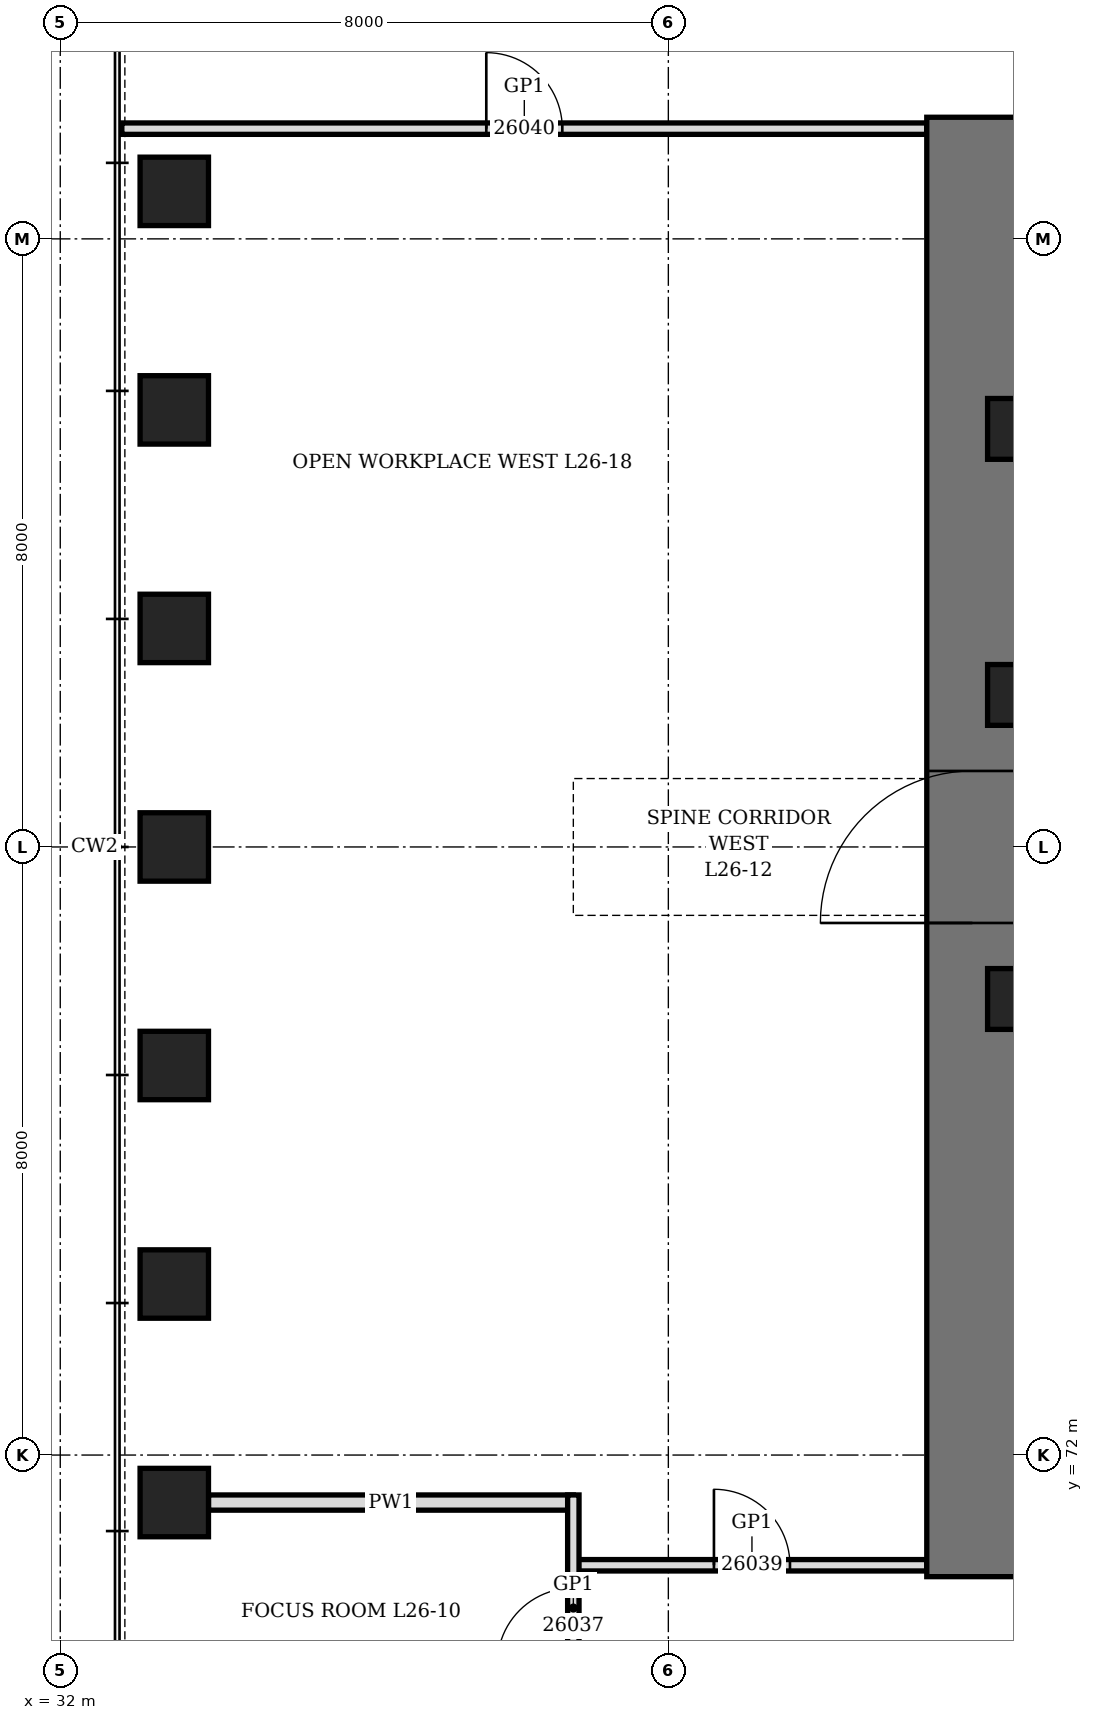
"""IFC4 building model, lengths in metres.
Left out: names, types, materials, properties, quantities, classifications, styles, units other than length and angle.
Written with IfcOpenShell. Run it as: python <this file> out.ifc"""

import sys

from ifc_helpers import new_model, si_unit, direction, frame, frame_2d, origin, origin_2d, place, context, subcontext, project, spatial, rectangle, hollow_rectangle, extrude, element, fill, save


model = new_model("IFC4")
c1 = context("Model", 3, precision=1e-05, world=origin(), true_north=direction((0.0, 1.0)))
c2 = subcontext(c1, "Body", "Model", "MODEL_VIEW")
j1 = project(units=[si_unit("LENGTHUNIT", "METRE"), si_unit("PLANEANGLEUNIT", "RADIAN")], contexts=[c1])
p1 = place(None, origin())
s1 = spatial("IfcSite", under=j1, at=p1, CompositionType="ELEMENT")
p2 = place(p1, origin())
s2 = spatial("IfcBuilding", under=s1, at=p2, CompositionType="ELEMENT")
p3 = place(p2, frame((0.0, 0.0, 120.7)))
s3 = spatial("IfcBuildingStorey", under=s2, at=p3, CompositionType="ELEMENT", Elevation=120.7)
for number, where, z_axis, x_axis in (
    (1, (33.5, 88.625, 0.0), (0.0, 0.0, 1.0), (0.0, 1.0, 0.0)),
    (2, (33.5, 85.75, 0.0), (0.0, 0.0, 1.0), (0.0, 1.0, 0.0)),
    (3, (33.5, 82.875, 0.0), (0.0, 0.0, 1.0), (0.0, 1.0, 0.0)),
    (4, (33.5, 80.0, 0.0), (0.0, 0.0, 1.0), (0.0, 1.0, 0.0)),
    (5, (33.5, 77.125, 0.0), (0.0, 0.0, 1.0), (0.0, 1.0, 0.0)),
    (6, (33.5, 74.25, 0.0), (0.0, 0.0, 1.0), (0.0, 1.0, 0.0)),
    (7, (33.5, 71.375, 0.0), (0.0, 0.0, 1.0), (0.0, 1.0, 0.0)),
):
    element("IfcColumn", number, at=place(p3, frame(where, z_axis=z_axis, x_axis=x_axis)), inside=s3, PredefinedType="COLUMN", context=c2, shape_type="SweptSolid", body=[
        extrude(hollow_rectangle(XDim=0.9, YDim=0.9, WallThickness=0.15, at=origin_2d()), origin(), (0.0, 0.0, 1.0), 4.2),
    ])
p4 = place(p3, frame((44.0, 70.4, 0.0), z_axis=(0.0, 0.0, 1.0), x_axis=(0.0, 1.0, 0.0)))
e8 = element("IfcWall", 8, at=p4, inside=s3, PredefinedType="SHEAR", context=c2, shape_type="SweptSolid", body=[
    extrude(rectangle(XDim=19.2, YDim=1.2, at=frame_2d((9.6, 0.0))), origin(), (0.0, 0.0, 1.0), 4.2),
])
p5 = place(p4, frame((8.6, 0.0, 0.0)))
e9 = element("IfcOpeningElement", 9, at=p5, cuts=e8, PredefinedType="OPENING", context=c2, shape_type="SweptSolid", body=[
    extrude(rectangle(XDim=2.0, YDim=2.4, at=frame_2d((1.0, 1.2))), frame((0.0, 0.61, 0.0), z_axis=(0.0, -1.0, 0.0), x_axis=(1.0, 0.0, 0.0)), (0.0, 0.0, 1.0), 1.22),
])
for number, where, z_axis, x_axis in (
    (10, (44.6, 78.0, 0.0), (0.0, 0.0, 1.0), (1.0, 0.0, 0.0)),
    (11, (44.6, 82.0, 0.0), (0.0, 0.0, 1.0), (1.0, 0.0, 0.0)),
    (12, (44.6, 85.5, 0.0), (0.0, 0.0, 1.0), (1.0, 0.0, 0.0)),
):
    element("IfcColumn", number, at=place(p3, frame(where, z_axis=z_axis, x_axis=x_axis)), inside=s3, PredefinedType="COLUMN", context=c2, shape_type="SweptSolid", body=[
        extrude(hollow_rectangle(XDim=0.8, YDim=0.8, WallThickness=0.1, at=origin_2d()), origin(), (0.0, 0.0, 1.0), 4.2),
    ])
p6 = place(p3, frame((33.95, 71.375, 0.0), z_axis=(0.0, 0.0, 1.0), x_axis=(1.0, 0.0, 0.0)))
e13 = element("IfcWall", 13, at=p6, inside=s3, PredefinedType="PARTITIONING", context=c2, shape_type="SweptSolid", body=[
    extrude(rectangle(XDim=4.8, YDim=0.2, at=frame_2d((2.4, 0.0))), origin(), (0.0, 0.0, 1.0), 3.428),
])
p7 = place(p3, frame((38.8, 70.55, 0.0), z_axis=(0.0, 0.0, 1.0), x_axis=(1.0, 0.0, 0.0)))
e14 = element("IfcWall", 14, at=p7, inside=s3, PredefinedType="PARTITIONING", context=c2, shape_type="SweptSolid", body=[
    extrude(rectangle(XDim=4.6, YDim=0.15, at=frame_2d((2.3, 0.0))), origin(), (0.0, 0.0, 1.0), 4.04),
])
p8 = place(p7, frame((1.8, 0.0, 0.0)))
e15 = element("IfcOpeningElement", 15, at=p8, cuts=e14, PredefinedType="OPENING", context=c2, shape_type="SweptSolid", body=[
    extrude(rectangle(XDim=1.0, YDim=2.4, at=frame_2d((0.5, 1.2))), frame((0.0, 0.085, 0.0), z_axis=(0.0, -1.0, 0.0), x_axis=(1.0, 0.0, 0.0)), (0.0, 0.0, 1.0), 0.17),
])
p9 = place(p3, frame((32.81, 89.45, 0.0), z_axis=(0.0, 0.0, 1.0), x_axis=(1.0, 0.0, 0.0)))
e16 = element("IfcWall", 16, at=p9, inside=s3, PredefinedType="PARTITIONING", context=c2, shape_type="SweptSolid", body=[
    extrude(rectangle(XDim=10.59, YDim=0.15, at=frame_2d((5.295, 0.0))), origin(), (0.0, 0.0, 1.0), 4.04),
])
p10 = place(p9, frame((4.795, 0.0, 0.0)))
e17 = element("IfcOpeningElement", 17, at=p10, cuts=e16, PredefinedType="OPENING", context=c2, shape_type="SweptSolid", body=[
    extrude(rectangle(XDim=1.0, YDim=2.4, at=frame_2d((0.5, 1.2))), frame((0.0, 0.085, 0.0), z_axis=(0.0, -1.0, 0.0), x_axis=(1.0, 0.0, 0.0)), (0.0, 0.0, 1.0), 0.17),
])
p11 = place(p3, frame((38.75, 68.5, 0.0), z_axis=(0.0, 0.0, 1.0), x_axis=(0.0, 1.0, 0.0)))
e18 = element("IfcWall", 18, at=p11, inside=s3, PredefinedType="PARTITIONING", context=c2, shape_type="SweptSolid", body=[
    extrude(rectangle(XDim=2.975, YDim=0.15, at=frame_2d((1.488, 0.0))), origin(), (0.0, 0.0, 1.0), 4.04),
])
p12 = place(p11, frame((0.75, 0.0, 0.0)))
e19 = element("IfcOpeningElement", 19, at=p12, cuts=e18, PredefinedType="OPENING", context=c2, shape_type="SweptSolid", body=[
    extrude(rectangle(XDim=1.0, YDim=2.4, at=frame_2d((0.5, 1.2))), frame((0.0, 0.085, 0.0), z_axis=(0.0, -1.0, 0.0), x_axis=(1.0, 0.0, 0.0)), (0.0, 0.0, 1.0), 0.17),
])
p13 = place(p5, origin())
e20 = element("IfcDoor", 20, at=p13, inside=s3, OperationType="DOUBLE_DOOR_SINGLE_SWING", PredefinedType="DOOR", context=c2, shape_type="SweptSolid", body=[
    extrude(rectangle(XDim=2.0, YDim=2.4, at=frame_2d((1.0, 1.2))), frame((0.0, 0.35, 0.0), z_axis=(0.0, -1.0, 0.0), x_axis=(1.0, 0.0, 0.0)), (0.0, 0.0, 1.0), 0.7),
])
fill(e9, e20)
p14 = place(p12, origin())
e21 = element("IfcDoor", 21, at=p14, inside=s3, OperationType="SINGLE_SWING_RIGHT", PredefinedType="DOOR", context=c2, shape_type="SweptSolid", body=[
    extrude(rectangle(XDim=1.0, YDim=2.4, at=frame_2d((0.5, 1.2))), frame((0.0, 0.075, 0.0), z_axis=(0.0, -1.0, 0.0), x_axis=(1.0, 0.0, 0.0)), (0.0, 0.0, 1.0), 0.149),
])
fill(e19, e21)
p15 = place(p8, origin())
e22 = element("IfcDoor", 22, at=p15, inside=s3, OperationType="SINGLE_SWING_RIGHT", PredefinedType="DOOR", context=c2, shape_type="SweptSolid", body=[
    extrude(rectangle(XDim=1.0, YDim=2.4, at=frame_2d((0.5, 1.2))), frame((0.0, 0.075, 0.0), z_axis=(0.0, -1.0, 0.0), x_axis=(1.0, 0.0, 0.0)), (0.0, 0.0, 1.0), 0.149),
])
fill(e15, e22)
p16 = place(p10, origin())
e23 = element("IfcDoor", 23, at=p16, inside=s3, OperationType="SINGLE_SWING_RIGHT", PredefinedType="DOOR", context=c2, shape_type="SweptSolid", body=[
    extrude(rectangle(XDim=1.0, YDim=2.4, at=frame_2d((0.5, 1.2))), frame((0.0, 0.075, 0.0), z_axis=(0.0, -1.0, 0.0), x_axis=(1.0, 0.0, 0.0)), (0.0, 0.0, 1.0), 0.149),
])
fill(e17, e23)
save(model, sys.argv[1])
